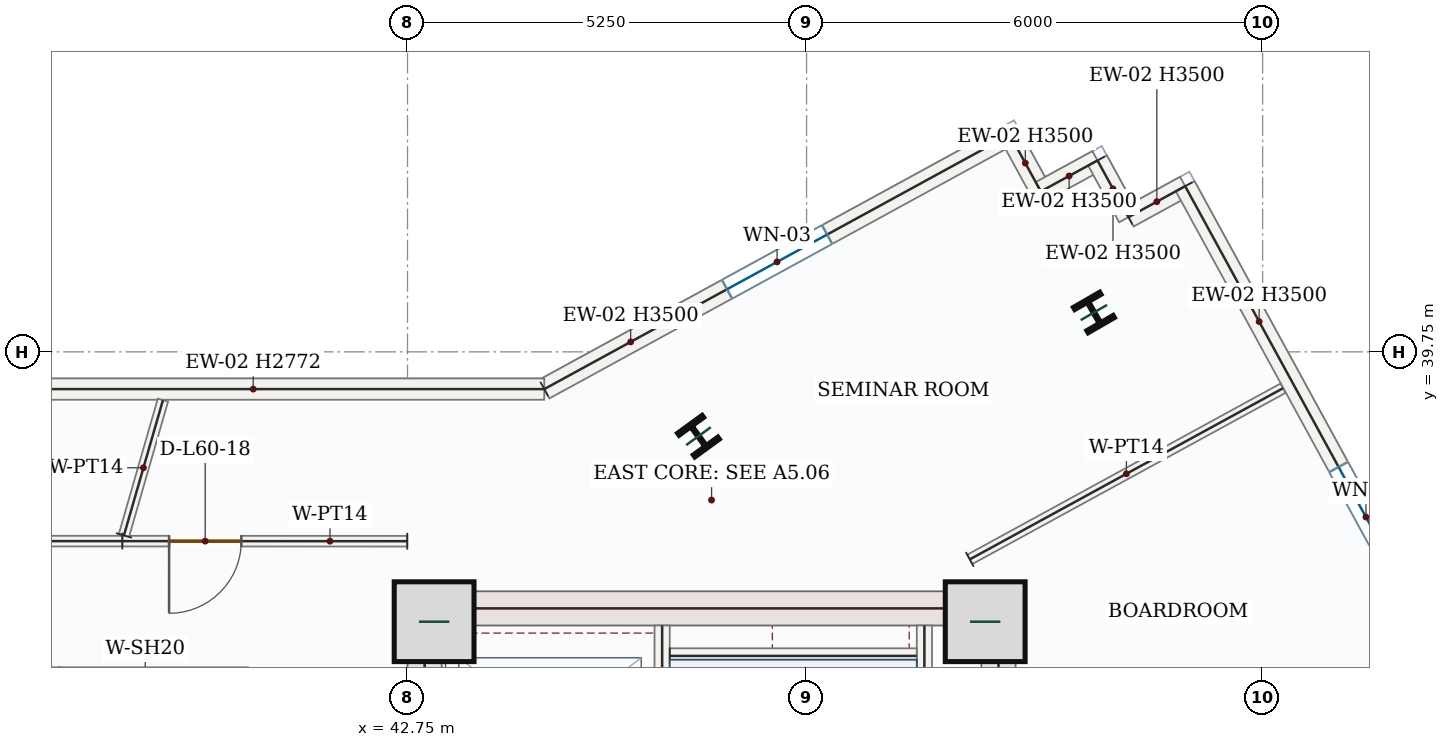
"""IFC4 building model, lengths in metres.
Left out: names, types, materials, properties, quantities, classifications, styles, units other than length and angle.
Written with IfcOpenShell. Run it as: python <this file> out.ifc"""

import sys

from ifc_helpers import new_model, si_unit, direction, frame, frame_2d, origin, origin_2d, place, context, subcontext, project, spatial, rectangle, i_section, extrude, source, transform, mapped, element, fill, save


model = new_model("IFC4")
c1 = context("Model", 3, precision=1e-05, world=origin(), true_north=direction((0.0, 1.0)))
c2 = subcontext(c1, "Body", "Model", "MODEL_VIEW")
j1 = project(units=[si_unit("LENGTHUNIT", "METRE"), si_unit("PLANEANGLEUNIT", "RADIAN")], contexts=[c1])
p1 = place(None, origin())
s1 = spatial("IfcSite", under=j1, at=p1, CompositionType="ELEMENT")
p2 = place(p1, origin())
s2 = spatial("IfcBuilding", under=s1, at=p2, CompositionType="ELEMENT")
p3 = place(p2, frame((0.0, 0.0, 254.1)))
s3 = spatial("IfcBuildingStorey", under=s2, at=p3, CompositionType="ELEMENT", Elevation=254.1)
p4 = place(p3, frame((42.975, 28.05, 0.0), z_axis=(0.0, 0.0, 1.0), x_axis=(0.0, 1.0, 0.0)))
e1 = element("IfcWall", 1, at=p4, inside=s3, PredefinedType="SHEAR", context=c2, shape_type="SweptSolid", body=[
    extrude(rectangle(XDim=8.55, YDim=0.45, at=frame_2d((4.275, 0.0))), origin(), (0.0, 0.0, 1.0), 3.5),
])
p5 = place(p4, frame((1.5, 0.0, 0.0)))
e2 = element("IfcOpeningElement", 2, at=p5, cuts=e1, PredefinedType="OPENING", context=c2, shape_type="SweptSolid", body=[
    extrude(rectangle(XDim=1.1, YDim=2.2, at=frame_2d((0.55, 1.1))), frame((0.0, 0.235, 0.0), z_axis=(0.0, -1.0, 0.0), x_axis=(1.0, 0.0, 0.0)), (0.0, 0.0, 1.0), 0.47),
])
m1 = source(origin(), c2, "Body", "SweptSolid", [
    extrude(rectangle(XDim=8.55, YDim=0.45, at=frame_2d((4.275, 0.0))), origin(), (0.0, 0.0, 1.0), 3.5),
])
p6 = place(p3, frame((50.525, 28.05, 0.0), z_axis=(0.0, 0.0, 1.0), x_axis=(0.0, 1.0, 0.0)))
e3 = element("IfcWall", 3, at=p6, inside=s3, PredefinedType="SHEAR", context=c2, shape_type="MappedRepresentation", body=[
    mapped(m1, transform((0.0, 0.0, 0.0), x_axis=(1.0, 0.0, 0.0), y_axis=(0.0, 1.0, 0.0), z_axis=(0.0, 0.0, 1.0), scale=1.0)),
])
m2 = source(origin(), c2, "Body", "SweptSolid", [
    extrude(rectangle(XDim=7.1, YDim=0.45, at=frame_2d((3.55, 0.0))), origin(), (0.0, 0.0, 1.0), 3.5),
])
p7 = place(p3, frame((43.2, 36.375, 0.0), z_axis=(0.0, 0.0, 1.0), x_axis=(1.0, 0.0, 0.0)))
e4 = element("IfcWall", 4, at=p7, inside=s3, PredefinedType="SHEAR", context=c2, shape_type="MappedRepresentation", body=[
    mapped(m2, transform((0.0, 0.0, 0.0), x_axis=(1.0, 0.0, 0.0), y_axis=(0.0, 1.0, 0.0), z_axis=(0.0, 0.0, 1.0), scale=1.0)),
])
m3 = source(origin(), c2, "Body", "SweptSolid", [
    extrude(rectangle(XDim=1.05, YDim=1.05, at=origin_2d()), origin(), (0.0, 0.0, 1.0), 3.75),
])
for number, where, z_axis, x_axis in (
    (5, (43.1, 36.2, 0.0), (0.0, 0.0, 1.0), (1.0, 0.0, 0.0)),
    (6, (50.35, 36.2, 0.0), (0.0, 0.0, 1.0), (1.0, 0.0, 0.0)),
):
    element("IfcColumn", number, at=place(p3, frame(where, z_axis=z_axis, x_axis=x_axis)), inside=s3, PredefinedType="COLUMN", context=c2, shape_type="MappedRepresentation", body=[
        mapped(m3, transform((0.0, 0.0, 0.0), x_axis=(1.0, 0.0, 0.0), y_axis=(0.0, 1.0, 0.0), z_axis=(0.0, 0.0, 1.0), scale=1.0)),
    ])
m4 = source(origin(), c2, "Body", "SweptSolid", [
    extrude(i_section(OverallWidth=0.399, OverallDepth=0.386, WebThickness=0.021, FlangeThickness=0.033, FilletRadius=0.018, at=origin_2d()), origin(), (0.0, 0.0, 1.0), 3.75),
])
for number, where, z_axis, x_axis in (
    (7, (46.578, 38.641, 0.0), (0.0, 0.0, 1.0), (0.809, 0.588, 0.0)),
    (8, (51.78, 40.268, 0.0), (0.0, 0.0, 1.0), (0.866, 0.5, 0.0)),
):
    element("IfcColumn", number, at=place(p3, frame(where, z_axis=z_axis, x_axis=x_axis)), inside=s3, PredefinedType="COLUMN", context=c2, shape_type="MappedRepresentation", body=[
        mapped(m4, transform((0.0, 0.0, 0.0), x_axis=(1.0, 0.0, 0.0), y_axis=(0.0, 1.0, 0.0), z_axis=(0.0, 0.0, 1.0), scale=1.0)),
    ])
p8 = place(p3, frame((44.549, 39.26, 0.0), z_axis=(0.0, 0.0, 1.0), x_axis=(0.877569176667, 0.479450039279, 0.0)))
e9 = element("IfcWall", 9, at=p8, inside=s3, PredefinedType="SOLIDWALL", context=c2, shape_type="SweptSolid", body=[
    extrude(rectangle(XDim=6.979, YDim=0.28, at=frame_2d((3.49, 0.0))), origin(), (0.0, 0.0, 1.0), 3.5),
])
p9 = place(p8, frame((2.74, 0.0, 0.85)))
e10 = element("IfcOpeningElement", 10, at=p9, cuts=e9, PredefinedType="OPENING", context=c2, shape_type="SweptSolid", body=[
    extrude(rectangle(XDim=1.5, YDim=1.5, at=frame_2d((0.75, 0.75))), frame((0.0, 0.15, 0.0), z_axis=(0.0, -1.0, 0.0), x_axis=(1.0, 0.0, 0.0)), (0.0, 0.0, 1.0), 0.3),
])
m5 = source(origin(), c2, "Body", "SweptSolid", [
    extrude(rectangle(XDim=0.85, YDim=0.28, at=frame_2d((0.425, 0.0))), origin(), (0.0, 0.0, 1.0), 3.5),
])
for number, where, z_axis, x_axis in (
    (11, (50.674, 42.606, 0.0), (0.0, 0.0, 1.0), (0.479, -0.878, 0.0)),
    (12, (51.082, 41.86, 0.0), (0.0, 0.0, 1.0), (0.878, 0.479, 0.0)),
):
    element("IfcWall", number, at=place(p3, frame(where, z_axis=z_axis, x_axis=x_axis)), inside=s3, PredefinedType="SOLIDWALL", context=c2, shape_type="MappedRepresentation", body=[
        mapped(m5, transform((0.0, 0.0, 0.0), x_axis=(1.0, 0.0, 0.0), y_axis=(0.0, 1.0, 0.0), z_axis=(0.0, 0.0, 1.0), scale=1.0)),
    ])
m6 = source(origin(), c2, "Body", "SweptSolid", [
    extrude(rectangle(XDim=0.85, YDim=0.28, at=frame_2d((0.425, 0.0))), origin(), (0.0, 0.0, 1.0), 3.5),
])
p10 = place(p3, frame((51.827, 42.268, 0.0), z_axis=(0.0, 0.0, 1.0), x_axis=(0.479656876283, -0.877456141943, 0.0)))
e13 = element("IfcWall", 13, at=p10, inside=s3, PredefinedType="SOLIDWALL", context=c2, shape_type="MappedRepresentation", body=[
    mapped(m6, transform((0.0, 0.0, 0.0), x_axis=(1.0, 0.0, 0.0), y_axis=(0.0, 1.0, 0.0), z_axis=(0.0, 0.0, 1.0), scale=1.0)),
])
p11 = place(p3, frame((52.235, 41.522, 0.0), z_axis=(0.0, 0.0, 1.0), x_axis=(0.877577015132, 0.479435691737, 0.0)))
e14 = element("IfcWall", 14, at=p11, inside=s3, PredefinedType="SOLIDWALL", context=c2, shape_type="MappedRepresentation", body=[
    mapped(m5, transform((0.0, 0.0, 0.0), x_axis=(1.0, 0.0, 0.0), y_axis=(0.0, 1.0, 0.0), z_axis=(0.0, 0.0, 1.0), scale=1.0)),
])
p12 = place(p3, frame((52.981, 41.929, 0.0), z_axis=(0.0, 0.0, 1.0), x_axis=(0.479472774144, -0.877556755347, 0.0)))
e15 = element("IfcWall", 15, at=p12, inside=s3, PredefinedType="SOLIDWALL", context=c2, shape_type="SweptSolid", body=[
    extrude(rectangle(XDim=9.92, YDim=0.28, at=frame_2d((4.96, 0.0))), origin(), (0.0, 0.0, 1.0), 3.5),
])
p13 = place(p12, frame((4.21, 0.0, 0.85)))
e16 = element("IfcOpeningElement", 16, at=p13, cuts=e15, PredefinedType="OPENING", context=c2, shape_type="SweptSolid", body=[
    extrude(rectangle(XDim=1.5, YDim=1.5, at=frame_2d((0.75, 0.75))), frame((0.0, 0.15, 0.0), z_axis=(0.0, -1.0, 0.0), x_axis=(1.0, 0.0, 0.0)), (0.0, 0.0, 1.0), 0.3),
])
m7 = source(origin(), c2, "Body", "SweptSolid", [
    extrude(rectangle(XDim=7.658, YDim=0.28, at=frame_2d((3.829, 0.0))), origin(), (0.0, 0.0, 1.0), 2.772),
])
p14 = place(p3, frame((36.891, 39.26, 0.0), z_axis=(0.0, 0.0, 1.0), x_axis=(1.0, 0.0, 0.0)))
e17 = element("IfcWall", 17, at=p14, inside=s3, PredefinedType="SOLIDWALL", context=c2, shape_type="MappedRepresentation", body=[
    mapped(m7, transform((0.0, 0.0, 0.0), x_axis=(1.0, 0.0, 0.0), y_axis=(0.0, 1.0, 0.0), z_axis=(0.0, 0.0, 1.0), scale=1.0)),
])
m8 = source(origin(), c2, "Body", "SweptSolid", [
    extrude(rectangle(XDim=7.87, YDim=0.2, at=frame_2d((3.935, 0.0))), origin(), (0.0, 0.0, 1.0), 3.5),
])
p15 = place(p3, frame((49.55, 28.28, 0.0), z_axis=(0.0, 0.0, 1.0), x_axis=(0.0, 1.0, 0.0)))
e18 = element("IfcWall", 18, at=p15, inside=s3, PredefinedType="SOLIDWALL", context=c2, shape_type="MappedRepresentation", body=[
    mapped(m8, transform((0.0, 0.0, 0.0), x_axis=(1.0, 0.0, 0.0), y_axis=(0.0, 1.0, 0.0), z_axis=(0.0, 0.0, 1.0), scale=1.0)),
])
p16 = place(p3, frame((46.1, 28.15, 0.0), z_axis=(0.0, 0.0, 1.0), x_axis=(0.0, 1.0, 0.0)))
e19 = element("IfcWall", 19, at=p16, inside=s3, PredefinedType="SOLIDWALL", context=c2, shape_type="SweptSolid", body=[
    extrude(rectangle(XDim=8.0, YDim=0.2, at=frame_2d((4.0, 0.0))), origin(), (0.0, 0.0, 1.0), 3.5),
])
p17 = place(p16, frame((0.4, 0.0, 0.0)))
e20 = element("IfcOpeningElement", 20, at=p17, cuts=e19, PredefinedType="OPENING", context=c2, shape_type="SweptSolid", body=[
    extrude(rectangle(XDim=1.05, YDim=2.15, at=frame_2d((0.525, 1.075))), frame((0.0, 0.11, 0.0), z_axis=(0.0, -1.0, 0.0), x_axis=(1.0, 0.0, 0.0)), (0.0, 0.0, 1.0), 0.22),
])
m9 = source(origin(), c2, "Body", "SweptSolid", [
    extrude(rectangle(XDim=3.25, YDim=0.2, at=frame_2d((1.625, 0.0))), origin(), (0.0, 0.0, 1.0), 3.5),
])
p18 = place(p3, frame((46.2, 35.75, 0.0), z_axis=(0.0, 0.0, 1.0), x_axis=(1.0, 0.0, 0.0)))
e21 = element("IfcWall", 21, at=p18, inside=s3, PredefinedType="SOLIDWALL", context=c2, shape_type="MappedRepresentation", body=[
    mapped(m9, transform((0.0, 0.0, 0.0), x_axis=(1.0, 0.0, 0.0), y_axis=(0.0, 1.0, 0.0), z_axis=(0.0, 0.0, 1.0), scale=1.0)),
])
m10 = source(origin(), c2, "Body", "SweptSolid", [
    extrude(rectangle(XDim=2.4, YDim=0.2, at=frame_2d((1.2, 0.0))), origin(), (0.0, 0.0, 1.0), 3.5),
])
p19 = place(p3, frame((38.05, 33.2, 0.0), z_axis=(0.0, 0.0, 1.0), x_axis=(0.0, 1.0, 0.0)))
e22 = element("IfcWall", 22, at=p19, inside=s3, PredefinedType="SOLIDWALL", context=c2, shape_type="MappedRepresentation", body=[
    mapped(m10, transform((0.0, 0.0, 0.0), x_axis=(1.0, 0.0, 0.0), y_axis=(0.0, 1.0, 0.0), z_axis=(0.0, 0.0, 1.0), scale=1.0)),
])
p20 = place(p3, frame((40.55, 33.2, 0.0), z_axis=(0.0, 0.0, 1.0), x_axis=(0.0, 1.0, 0.0)))
e23 = element("IfcWall", 23, at=p20, inside=s3, PredefinedType="SOLIDWALL", context=c2, shape_type="SweptSolid", body=[
    extrude(rectangle(XDim=2.4, YDim=0.2, at=frame_2d((1.2, 0.0))), origin(), (0.0, 0.0, 1.0), 3.5),
])
p21 = place(p20, frame((0.65, 0.0, 0.0)))
e24 = element("IfcOpeningElement", 24, at=p21, cuts=e23, PredefinedType="OPENING", context=c2, shape_type="SweptSolid", body=[
    extrude(rectangle(XDim=1.1, YDim=2.15, at=frame_2d((0.55, 1.075))), frame((0.0, 0.11, 0.0), z_axis=(0.0, -1.0, 0.0), x_axis=(1.0, 0.0, 0.0)), (0.0, 0.0, 1.0), 0.22),
])
m11 = source(origin(), c2, "Body", "SweptSolid", [
    extrude(rectangle(XDim=4.695, YDim=0.14, at=frame_2d((2.348, 0.0))), origin(), (0.0, 0.0, 1.0), 3.5),
])
p22 = place(p3, frame((50.148, 37.02, 0.0), z_axis=(0.0, 0.0, 1.0), x_axis=(0.877559526902, 0.479467701461, 0.0)))
e25 = element("IfcWall", 25, at=p22, inside=s3, PredefinedType="PARTITIONING", context=c2, shape_type="MappedRepresentation", body=[
    mapped(m11, transform((0.0, 0.0, 0.0), x_axis=(1.0, 0.0, 0.0), y_axis=(0.0, 1.0, 0.0), z_axis=(0.0, 0.0, 1.0), scale=1.0)),
])
p23 = place(p3, frame((56.109, 35.901, 0.0), z_axis=(0.0, 0.0, 1.0), x_axis=(-0.877574248726, -0.479440755436, 0.0)))
e26 = element("IfcWall", 26, at=p23, inside=s3, PredefinedType="PARTITIONING", context=c2, shape_type="SweptSolid", body=[
    extrude(rectangle(XDim=6.102, YDim=0.14, at=frame_2d((3.051, 0.0))), origin(), (0.0, 0.0, 1.0), 3.5),
])
p24 = place(p23, frame((4.018, 0.0, 0.0)))
e27 = element("IfcOpeningElement", 27, at=p24, cuts=e26, PredefinedType="OPENING", context=c2, shape_type="SweptSolid", body=[
    extrude(rectangle(XDim=0.95, YDim=2.15, at=frame_2d((0.475, 1.075))), frame((0.0, 0.08, 0.0), z_axis=(0.0, -1.0, 0.0), x_axis=(1.0, 0.0, 0.0)), (0.0, 0.0, 1.0), 0.16),
])
p25 = place(p3, frame((42.747, 37.259, 0.0), z_axis=(0.0, 0.0, 1.0), x_axis=(-0.99999994699, 0.000325605609, 0.0)))
e28 = element("IfcWall", 28, at=p25, inside=s3, PredefinedType="PARTITIONING", context=c2, shape_type="SweptSolid", body=[
    extrude(rectangle(XDim=3.749, YDim=0.14, at=frame_2d((1.875, 0.0))), origin(), (0.0, 0.0, 1.0), 3.5),
])
p26 = place(p25, frame((2.183, 0.0, 0.0)))
e29 = element("IfcOpeningElement", 29, at=p26, cuts=e28, PredefinedType="OPENING", context=c2, shape_type="SweptSolid", body=[
    extrude(rectangle(XDim=0.95, YDim=2.15, at=frame_2d((0.475, 1.075))), frame((0.0, 0.08, 0.0), z_axis=(0.0, -1.0, 0.0), x_axis=(1.0, 0.0, 0.0)), (0.0, 0.0, 1.0), 0.16),
])
m12 = source(origin(), c2, "Body", "SweptSolid", [
    extrude(rectangle(XDim=1.853, YDim=0.14, at=frame_2d((0.926, 0.0))), origin(), (0.0, 0.0, 1.0), 3.5),
])
p27 = place(p3, frame((39.019, 37.335, 0.0), z_axis=(0.0, 0.0, 1.0), x_axis=(0.276896245691, 0.960899822626, 0.0)))
e30 = element("IfcWall", 30, at=p27, inside=s3, PredefinedType="PARTITIONING", context=c2, shape_type="MappedRepresentation", body=[
    mapped(m12, transform((0.0, 0.0, 0.0), x_axis=(1.0, 0.0, 0.0), y_axis=(0.0, 1.0, 0.0), z_axis=(0.0, 0.0, 1.0), scale=1.0)),
])
p28 = place(p3, frame((38.998, 37.26, 0.0), z_axis=(0.0, 0.0, 1.0), x_axis=(-1.0, 0.0, 0.0)))
e31 = element("IfcWall", 31, at=p28, inside=s3, PredefinedType="PARTITIONING", context=c2, shape_type="SweptSolid", body=[
    extrude(rectangle(XDim=8.956, YDim=0.14, at=frame_2d((4.478, 0.0))), origin(), (0.0, 0.0, 1.0), 3.5),
])
p29 = place(p28, frame((2.802, 0.0, 0.0)))
e32 = element("IfcOpeningElement", 32, at=p29, cuts=e31, PredefinedType="OPENING", context=c2, shape_type="SweptSolid", body=[
    extrude(rectangle(XDim=0.95, YDim=2.15, at=frame_2d((0.475, 1.075))), frame((0.0, 0.08, 0.0), z_axis=(0.0, -1.0, 0.0), x_axis=(1.0, 0.0, 0.0)), (0.0, 0.0, 1.0), 0.16),
])
m13 = source(origin(), c2, "Body", "SweptSolid", [
    extrude(rectangle(XDim=1.5, YDim=1.5, at=frame_2d((0.75, 0.75))), frame((0.0, 0.03, 0.0), z_axis=(0.0, -1.0, 0.0), x_axis=(1.0, 0.0, 0.0)), (0.0, 0.0, 1.0), 0.06),
])
p30 = place(p9, origin())
e33 = element("IfcWindow", 33, at=p30, inside=s3, PartitioningType="SINGLE_PANEL", PredefinedType="WINDOW", context=c2, shape_type="MappedRepresentation", body=[
    mapped(m13, transform((0.0, 0.0, 0.0), x_axis=(1.0, 0.0, 0.0), y_axis=(0.0, 1.0, 0.0), z_axis=(0.0, 0.0, 1.0), scale=1.0)),
])
fill(e10, e33)
p31 = place(p13, origin())
e34 = element("IfcWindow", 34, at=p31, inside=s3, PartitioningType="SINGLE_PANEL", PredefinedType="WINDOW", context=c2, shape_type="MappedRepresentation", body=[
    mapped(m13, transform((0.0, 0.0, 0.0), x_axis=(1.0, 0.0, 0.0), y_axis=(0.0, 1.0, 0.0), z_axis=(0.0, 0.0, 1.0), scale=1.0)),
])
fill(e16, e34)
m14 = source(origin(), c2, "Body", "SweptSolid", [
    extrude(rectangle(XDim=0.95, YDim=2.15, at=frame_2d((0.475, 1.075))), frame((0.0, 0.025, 0.0), z_axis=(0.0, -1.0, 0.0), x_axis=(1.0, 0.0, 0.0)), (0.0, 0.0, 1.0), 0.05),
])
p32 = place(p26, origin())
e35 = element("IfcDoor", 35, at=p32, inside=s3, OperationType="SINGLE_SWING_RIGHT", PredefinedType="DOOR", context=c2, shape_type="MappedRepresentation", body=[
    mapped(m14, transform((0.0, 0.0, 0.0), x_axis=(1.0, 0.0, 0.0), y_axis=(0.0, 1.0, 0.0), z_axis=(0.0, 0.0, 1.0), scale=1.0)),
])
fill(e29, e35)
save(model, sys.argv[1])
